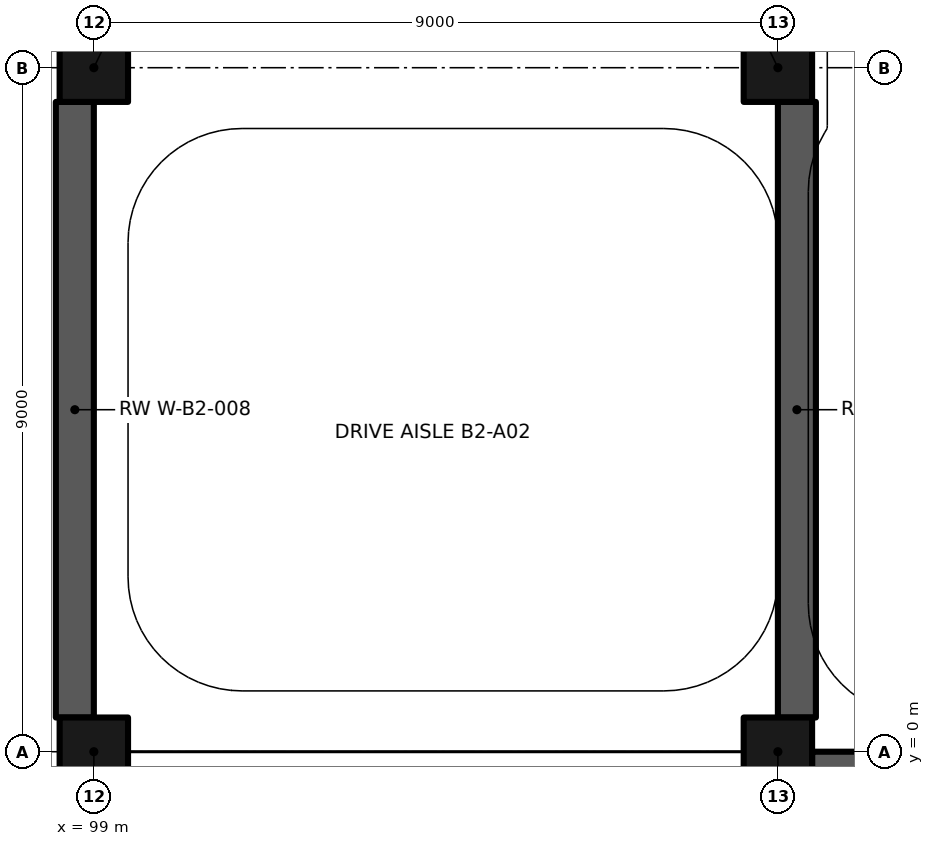
"""IFC4 building model, lengths in metres.
Left out: names, types, materials, properties, quantities, classifications, styles, units other than length and angle.
Written with IfcOpenShell. Run it as: python <this file> out.ifc"""

import sys

from ifc_helpers import new_model, si_unit, direction, frame, frame_2d, origin, origin_2d, place, context, subcontext, project, spatial, rectangle, extrude, element, save


model = new_model("IFC4")
c1 = context("Model", 3, precision=1e-05, world=origin(), true_north=direction((0.0, 1.0)))
c2 = subcontext(c1, "Body", "Model", "MODEL_VIEW")
j1 = project(units=[si_unit("LENGTHUNIT", "METRE"), si_unit("PLANEANGLEUNIT", "RADIAN")], contexts=[c1])
p1 = place(None, origin())
s1 = spatial("IfcSite", under=j1, at=p1, CompositionType="ELEMENT")
p2 = place(p1, origin())
s2 = spatial("IfcBuilding", under=s1, at=p2, CompositionType="ELEMENT")
p3 = place(p2, frame((0.0, 0.0, -9.9)))
s3 = spatial("IfcBuildingStorey", under=s2, at=p3, CompositionType="ELEMENT", Elevation=-9.9)
p4 = place(p3, frame((108.45, -0.2, -0.5), z_axis=(0.0, 0.0, 1.0), x_axis=(1.0, 0.0, 0.0)))
e1 = element("IfcWall", 1, at=p4, inside=s3, PredefinedType="SOLIDWALL", context=c2, shape_type="SweptSolid", body=[
    extrude(rectangle(XDim=8.1, YDim=0.4, at=frame_2d((4.05, 0.0))), origin(), (0.0, 0.0, 1.0), 5.3),
])
for number, where, z_axis, x_axis in (
    (2, (98.75, 0.45, -0.5), (0.0, 0.0, 1.0), (0.0, 1.0, 0.0)),
    (3, (108.25, 0.45, -0.5), (0.0, 0.0, 1.0), (0.0, 1.0, 0.0)),
):
    element("IfcWall", number, at=place(p3, frame(where, z_axis=z_axis, x_axis=x_axis)), inside=s3, PredefinedType="SOLIDWALL", context=c2, shape_type="SweptSolid", body=[
        extrude(rectangle(XDim=8.1, YDim=0.5, at=frame_2d((4.05, 0.0))), origin(), (0.0, 0.0, 1.0), 5.3),
    ])
for number, where, z_axis, x_axis in (
    (4, (99.0, 0.0, 0.0), (0.0, 0.0, 1.0), (1.0, 0.0, 0.0)),
    (5, (108.0, 0.0, 0.0), (0.0, 0.0, 1.0), (1.0, 0.0, 0.0)),
    (6, (99.0, 9.0, 0.0), (0.0, 0.0, 1.0), (1.0, 0.0, 0.0)),
    (7, (108.0, 9.0, 0.0), (0.0, 0.0, 1.0), (1.0, 0.0, 0.0)),
):
    element("IfcColumn", number, at=place(p3, frame(where, z_axis=z_axis, x_axis=x_axis)), inside=s3, PredefinedType="COLUMN", context=c2, shape_type="SweptSolid", body=[
        extrude(rectangle(XDim=0.9, YDim=0.9, at=origin_2d()), origin(), (0.0, 0.0, 1.0), 4.8),
    ])
save(model, sys.argv[1])
